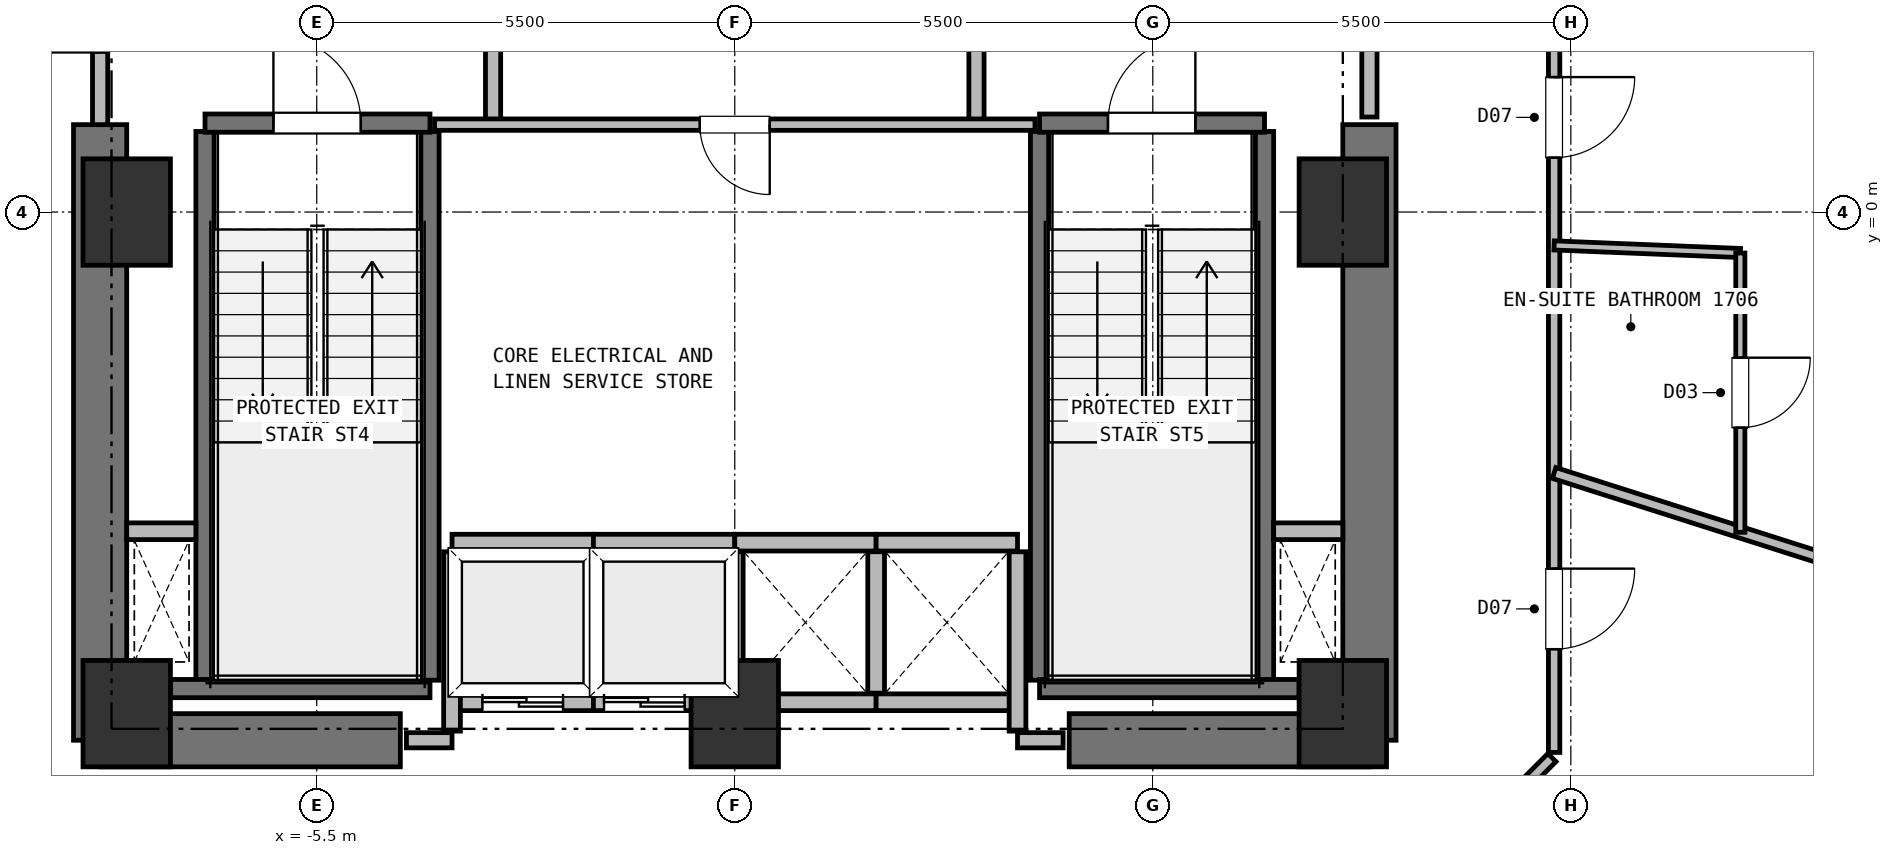
"""IFC4 building model, lengths in metres.
Left out: names, types, materials, properties, quantities, classifications, styles, units other than length and angle.
Written with IfcOpenShell. Run it as: python <this file> out.ifc"""

import sys

from ifc_helpers import new_model, si_unit, direction, frame, frame_2d, origin, origin_2d, place, context, subcontext, project, spatial, rectangle, extrude, element, fill, save


model = new_model("IFC4")
c1 = context("Model", 3, precision=1e-05, world=origin(), true_north=direction((0.0, 1.0)))
c2 = subcontext(c1, "Body", "Model", "MODEL_VIEW")
j1 = project(units=[si_unit("LENGTHUNIT", "METRE"), si_unit("PLANEANGLEUNIT", "RADIAN")], contexts=[c1])
p1 = place(None, origin())
s1 = spatial("IfcSite", under=j1, at=p1, CompositionType="ELEMENT")
p2 = place(p1, origin())
s2 = spatial("IfcBuilding", under=s1, at=p2, CompositionType="ELEMENT")
p3 = place(p2, frame((0.0, 0.0, 60.5)))
s3 = spatial("IfcBuildingStorey", under=s2, at=p3, CompositionType="ELEMENT", Elevation=60.5)
for number, where, z_axis, x_axis in (
    (1, (-8.0, -6.6, 0.0), (0.0, 0.0, 1.0), (1.0, 0.0, 0.0)),
    (2, (0.0, -6.6, 0.0), (0.0, 0.0, 1.0), (1.0, 0.0, 0.0)),
    (3, (8.0, -6.6, 0.0), (0.0, 0.0, 1.0), (1.0, 0.0, 0.0)),
    (4, (8.0, 0.0, 0.0), (0.0, 0.0, 1.0), (1.0, 0.0, 0.0)),
    (5, (-8.0, 0.0, 0.0), (0.0, 0.0, 1.0), (1.0, 0.0, 0.0)),
):
    element("IfcColumn", number, at=place(p3, frame(where, z_axis=z_axis, x_axis=x_axis)), inside=s3, PredefinedType="COLUMN", context=c2, shape_type="SweptSolid", body=[
        extrude(rectangle(XDim=1.15, YDim=1.4, at=origin_2d()), origin(), (0.0, 0.0, 1.0), 3.75),
    ])
for number, where, z_axis, x_axis in (
    (6, (-8.35, -6.95, 0.0), (0.0, 0.0, 1.0), (1.0, 0.0, 0.0)),
    (7, (4.4, -6.95, 0.0), (0.0, 0.0, 1.0), (1.0, 0.0, 0.0)),
):
    element("IfcWall", number, at=place(p3, frame(where, z_axis=z_axis, x_axis=x_axis)), inside=s3, PredefinedType="SHEAR", context=c2, shape_type="SweptSolid", body=[
        extrude(rectangle(XDim=3.95, YDim=0.7, at=frame_2d((1.975, 0.0))), origin(), (0.0, 0.0, 1.0), 3.5),
    ])
for number, where, z_axis, x_axis in (
    (8, (-8.35, -6.95, 0.0), (0.0, 0.0, 1.0), (0.0, 1.0, 0.0)),
    (9, (8.35, -6.95, 0.0), (0.0, 0.0, 1.0), (0.0, 1.0, 0.0)),
):
    element("IfcWall", number, at=place(p3, frame(where, z_axis=z_axis, x_axis=x_axis)), inside=s3, PredefinedType="SHEAR", context=c2, shape_type="SweptSolid", body=[
        extrude(rectangle(XDim=8.1, YDim=0.7, at=frame_2d((4.05, 0.0))), origin(), (0.0, 0.0, 1.0), 3.5),
    ])
p4 = place(p3, frame((-6.97, -6.16, 0.0), z_axis=(0.0, 0.0, 1.0), x_axis=(0.0, 1.0, 0.0)))
e10 = element("IfcWall", 10, at=p4, inside=s3, PredefinedType="SHEAR", context=c2, shape_type="SweptSolid", body=[
    extrude(rectangle(XDim=7.22, YDim=0.24, at=frame_2d((3.61, 0.0))), origin(), (0.0, 0.0, 1.0), 3.5),
])
p5 = place(p3, frame((-7.425, -6.27, 0.0), z_axis=(0.0, 0.0, 1.0), x_axis=(1.0, 0.0, 0.0)))
e11 = element("IfcWall", 11, at=p5, inside=s3, PredefinedType="SHEAR", context=c2, shape_type="SweptSolid", body=[
    extrude(rectangle(XDim=3.415, YDim=0.24, at=frame_2d((1.708, 0.0))), origin(), (0.0, 0.0, 1.0), 3.5),
])
p6 = place(p3, frame((-4.01, -6.16, 0.0), z_axis=(0.0, 0.0, 1.0), x_axis=(0.0, 1.0, 0.0)))
e12 = element("IfcWall", 12, at=p6, inside=s3, PredefinedType="SHEAR", context=c2, shape_type="SweptSolid", body=[
    extrude(rectangle(XDim=7.22, YDim=0.24, at=frame_2d((3.61, 0.0))), origin(), (0.0, 0.0, 1.0), 3.5),
])
p7 = place(p3, frame((-6.97, 1.17, 0.0), z_axis=(0.0, 0.0, 1.0), x_axis=(1.0, 0.0, 0.0)))
e13 = element("IfcWall", 13, at=p7, inside=s3, PredefinedType="SHEAR", context=c2, shape_type="SweptSolid", body=[
    extrude(rectangle(XDim=2.96, YDim=0.24, at=frame_2d((1.48, 0.0))), origin(), (0.0, 0.0, 1.0), 3.5),
])
p8 = place(p7, frame((0.9, 0.0, 0.0)))
e14 = element("IfcOpeningElement", 14, at=p8, cuts=e13, PredefinedType="OPENING", context=c2, shape_type="SweptSolid", body=[
    extrude(rectangle(XDim=1.15, YDim=2.15, at=frame_2d((0.575, 1.075))), frame((0.0, 0.13, 0.0), z_axis=(0.0, -1.0, 0.0), x_axis=(1.0, 0.0, 0.0)), (0.0, 0.0, 1.0), 0.26),
])
for number, where, z_axis, x_axis in (
    (15, (4.01, -6.16, 0.0), (0.0, 0.0, 1.0), (0.0, 1.0, 0.0)),
    (16, (6.97, -6.16, 0.0), (0.0, 0.0, 1.0), (0.0, 1.0, 0.0)),
):
    element("IfcWall", number, at=place(p3, frame(where, z_axis=z_axis, x_axis=x_axis)), inside=s3, PredefinedType="SHEAR", context=c2, shape_type="SweptSolid", body=[
        extrude(rectangle(XDim=7.22, YDim=0.24, at=frame_2d((3.61, 0.0))), origin(), (0.0, 0.0, 1.0), 3.5),
    ])
p9 = place(p3, frame((4.01, -6.27, 0.0), z_axis=(0.0, 0.0, 1.0), x_axis=(1.0, 0.0, 0.0)))
e17 = element("IfcWall", 17, at=p9, inside=s3, PredefinedType="SHEAR", context=c2, shape_type="SweptSolid", body=[
    extrude(rectangle(XDim=3.415, YDim=0.24, at=frame_2d((1.708, 0.0))), origin(), (0.0, 0.0, 1.0), 3.5),
])
p10 = place(p3, frame((4.01, 1.17, 0.0), z_axis=(0.0, 0.0, 1.0), x_axis=(1.0, 0.0, 0.0)))
e18 = element("IfcWall", 18, at=p10, inside=s3, PredefinedType="SHEAR", context=c2, shape_type="SweptSolid", body=[
    extrude(rectangle(XDim=2.96, YDim=0.24, at=frame_2d((1.48, 0.0))), origin(), (0.0, 0.0, 1.0), 3.5),
])
p11 = place(p10, frame((0.9, 0.0, 0.0)))
e19 = element("IfcOpeningElement", 19, at=p11, cuts=e18, PredefinedType="OPENING", context=c2, shape_type="SweptSolid", body=[
    extrude(rectangle(XDim=1.15, YDim=2.15, at=frame_2d((0.575, 1.075))), frame((0.0, 0.13, 0.0), z_axis=(0.0, -1.0, 0.0), x_axis=(1.0, 0.0, 0.0)), (0.0, 0.0, 1.0), 0.26),
])
for number, where, z_axis, x_axis in (
    (20, (-8.0, -4.2, 0.0), (0.0, 0.0, 1.0), (1.0, 0.0, 0.0)),
    (21, (7.09, -4.2, 0.0), (0.0, 0.0, 1.0), (1.0, 0.0, 0.0)),
):
    element("IfcWall", number, at=place(p3, frame(where, z_axis=z_axis, x_axis=x_axis)), inside=s3, PredefinedType="PARTITIONING", context=c2, shape_type="SweptSolid", body=[
        extrude(rectangle(XDim=0.91, YDim=0.22, at=frame_2d((0.455, 0.0))), origin(), (0.0, 0.0, 1.0), 3.5),
    ])
p12 = place(p3, frame((-3.72, -6.45, 0.0), z_axis=(0.0, 0.0, 1.0), x_axis=(1.0, 0.0, 0.0)))
e22 = element("IfcWall", 22, at=p12, inside=s3, PredefinedType="PARTITIONING", context=c2, shape_type="SweptSolid", body=[
    extrude(rectangle(XDim=1.86, YDim=0.22, at=frame_2d((0.93, 0.0))), origin(), (0.0, 0.0, 1.0), 3.08),
])
p13 = place(p12, frame((0.4, 0.0, 0.0)))
e23 = element("IfcOpeningElement", 23, at=p13, cuts=e22, PredefinedType="OPENING", context=c2, shape_type="SweptSolid", body=[
    extrude(rectangle(XDim=1.06, YDim=2.15, at=frame_2d((0.53, 1.075))), frame((0.0, 0.12, 0.0), z_axis=(0.0, -1.0, 0.0), x_axis=(1.0, 0.0, 0.0)), (0.0, 0.0, 1.0), 0.24),
])
p14 = place(p3, frame((-3.72, -4.35, 0.0), z_axis=(0.0, 0.0, 1.0), x_axis=(1.0, 0.0, 0.0)))
e24 = element("IfcWall", 24, at=p14, inside=s3, PredefinedType="PARTITIONING", context=c2, shape_type="SweptSolid", body=[
    extrude(rectangle(XDim=1.86, YDim=0.22, at=frame_2d((0.93, 0.0))), origin(), (0.0, 0.0, 1.0), 3.5),
])
p15 = place(p3, frame((-3.72, -6.83, 0.0), z_axis=(0.0, 0.0, 1.0), x_axis=(0.0, 1.0, 0.0)))
e25 = element("IfcWall", 25, at=p15, inside=s3, PredefinedType="PARTITIONING", context=c2, shape_type="SweptSolid", body=[
    extrude(rectangle(XDim=2.36, YDim=0.22, at=frame_2d((1.18, 0.0))), origin(), (0.0, 0.0, 1.0), 3.5),
])
p16 = place(p3, frame((-1.86, -6.33, 0.0), z_axis=(0.0, 0.0, 1.0), x_axis=(0.0, 1.0, 0.0)))
e26 = element("IfcWall", 26, at=p16, inside=s3, PredefinedType="PARTITIONING", context=c2, shape_type="SweptSolid", body=[
    extrude(rectangle(XDim=1.86, YDim=0.22, at=frame_2d((0.93, 0.0))), origin(), (0.0, 0.0, 1.0), 3.5),
])
p17 = place(p3, frame((-1.86, -6.45, 0.0), z_axis=(0.0, 0.0, 1.0), x_axis=(1.0, 0.0, 0.0)))
e27 = element("IfcWall", 27, at=p17, inside=s3, PredefinedType="PARTITIONING", context=c2, shape_type="SweptSolid", body=[
    extrude(rectangle(XDim=1.86, YDim=0.22, at=frame_2d((0.93, 0.0))), origin(), (0.0, 0.0, 1.0), 3.08),
])
p18 = place(p17, frame((0.14, 0.0, 0.0)))
e28 = element("IfcOpeningElement", 28, at=p18, cuts=e27, PredefinedType="OPENING", context=c2, shape_type="SweptSolid", body=[
    extrude(rectangle(XDim=1.06, YDim=2.15, at=frame_2d((0.53, 1.075))), frame((0.0, 0.12, 0.0), z_axis=(0.0, -1.0, 0.0), x_axis=(1.0, 0.0, 0.0)), (0.0, 0.0, 1.0), 0.24),
])
for number, where, z_axis, x_axis in (
    (29, (-1.86, -4.35, 0.0), (0.0, 0.0, 1.0), (1.0, 0.0, 0.0)),
    (30, (0.0, -6.33, 0.0), (0.0, 0.0, 1.0), (0.0, 1.0, 0.0)),
):
    element("IfcWall", number, at=place(p3, frame(where, z_axis=z_axis, x_axis=x_axis)), inside=s3, PredefinedType="PARTITIONING", context=c2, shape_type="SweptSolid", body=[
        extrude(rectangle(XDim=1.86, YDim=0.22, at=frame_2d((0.93, 0.0))), origin(), (0.0, 0.0, 1.0), 3.5),
    ])
p19 = place(p3, frame((0.0, -6.45, 0.0), z_axis=(0.0, 0.0, 1.0), x_axis=(1.0, 0.0, 0.0)))
e31 = element("IfcWall", 31, at=p19, inside=s3, PredefinedType="PARTITIONING", context=c2, shape_type="SweptSolid", body=[
    extrude(rectangle(XDim=1.86, YDim=0.22, at=frame_2d((0.93, 0.0))), origin(), (0.0, 0.0, 1.0), 3.08),
])
for number, where, z_axis, x_axis in (
    (32, (0.0, -4.35, 0.0), (0.0, 0.0, 1.0), (1.0, 0.0, 0.0)),
    (33, (1.86, -6.33, 0.0), (0.0, 0.0, 1.0), (0.0, 1.0, 0.0)),
):
    element("IfcWall", number, at=place(p3, frame(where, z_axis=z_axis, x_axis=x_axis)), inside=s3, PredefinedType="PARTITIONING", context=c2, shape_type="SweptSolid", body=[
        extrude(rectangle(XDim=1.86, YDim=0.22, at=frame_2d((0.93, 0.0))), origin(), (0.0, 0.0, 1.0), 3.5),
    ])
p20 = place(p3, frame((1.86, -6.45, 0.0), z_axis=(0.0, 0.0, 1.0), x_axis=(1.0, 0.0, 0.0)))
e34 = element("IfcWall", 34, at=p20, inside=s3, PredefinedType="PARTITIONING", context=c2, shape_type="SweptSolid", body=[
    extrude(rectangle(XDim=1.86, YDim=0.22, at=frame_2d((0.93, 0.0))), origin(), (0.0, 0.0, 1.0), 3.08),
])
p21 = place(p3, frame((1.86, -4.35, 0.0), z_axis=(0.0, 0.0, 1.0), x_axis=(1.0, 0.0, 0.0)))
e35 = element("IfcWall", 35, at=p21, inside=s3, PredefinedType="PARTITIONING", context=c2, shape_type="SweptSolid", body=[
    extrude(rectangle(XDim=1.86, YDim=0.22, at=frame_2d((0.93, 0.0))), origin(), (0.0, 0.0, 1.0), 3.5),
])
p22 = place(p3, frame((3.72, -6.83, 0.0), z_axis=(0.0, 0.0, 1.0), x_axis=(0.0, 1.0, 0.0)))
e36 = element("IfcWall", 36, at=p22, inside=s3, PredefinedType="PARTITIONING", context=c2, shape_type="SweptSolid", body=[
    extrude(rectangle(XDim=2.36, YDim=0.22, at=frame_2d((1.18, 0.0))), origin(), (0.0, 0.0, 1.0), 3.5),
])
p23 = place(p3, frame((-3.18, 1.15, 0.0), z_axis=(0.0, 0.0, 1.0), x_axis=(0.0, 1.0, 0.0)))
e37 = element("IfcWall", 37, at=p23, inside=s3, PredefinedType="PARTITIONING", context=c2, shape_type="SweptSolid", body=[
    extrude(rectangle(XDim=3.3, YDim=0.2, at=frame_2d((1.65, 0.0))), origin(), (0.0, 0.0, 1.0), 3.5),
])
p24 = place(p23, frame((1.08, 0.0, 0.0)))
e38 = element("IfcOpeningElement", 38, at=p24, cuts=e37, PredefinedType="OPENING", context=c2, shape_type="SweptSolid", body=[
    extrude(rectangle(XDim=1.15, YDim=2.15, at=frame_2d((0.575, 1.075))), frame((0.0, 0.11, 0.0), z_axis=(0.0, -1.0, 0.0), x_axis=(1.0, 0.0, 0.0)), (0.0, 0.0, 1.0), 0.22),
])
p25 = place(p3, frame((3.18, 1.15, 0.0), z_axis=(0.0, 0.0, 1.0), x_axis=(0.0, 1.0, 0.0)))
e39 = element("IfcWall", 39, at=p25, inside=s3, PredefinedType="PARTITIONING", context=c2, shape_type="SweptSolid", body=[
    extrude(rectangle(XDim=3.3, YDim=0.2, at=frame_2d((1.65, 0.0))), origin(), (0.0, 0.0, 1.0), 3.5),
])
p26 = place(p25, frame((1.08, 0.0, 0.0)))
e40 = element("IfcOpeningElement", 40, at=p26, cuts=e39, PredefinedType="OPENING", context=c2, shape_type="SweptSolid", body=[
    extrude(rectangle(XDim=1.15, YDim=2.15, at=frame_2d((0.575, 1.075))), frame((0.0, 0.11, 0.0), z_axis=(0.0, -1.0, 0.0), x_axis=(1.0, 0.0, 0.0)), (0.0, 0.0, 1.0), 0.22),
])
p27 = place(p3, frame((-8.35, 1.15, 0.0), z_axis=(0.0, 0.0, 1.0), x_axis=(0.0, 1.0, 0.0)))
e41 = element("IfcWall", 41, at=p27, inside=s3, PredefinedType="PARTITIONING", context=c2, shape_type="SweptSolid", body=[
    extrude(rectangle(XDim=5.4, YDim=0.2, at=frame_2d((2.7, 0.0))), origin(), (0.0, 0.0, 1.0), 3.5),
])
p28 = place(p27, frame((0.95, 0.0, 0.0)))
e42 = element("IfcOpeningElement", 42, at=p28, cuts=e41, PredefinedType="OPENING", context=c2, shape_type="SweptSolid", body=[
    extrude(rectangle(XDim=1.15, YDim=2.15, at=frame_2d((0.575, 1.075))), frame((0.0, 0.11, 0.0), z_axis=(0.0, -1.0, 0.0), x_axis=(1.0, 0.0, 0.0)), (0.0, 0.0, 1.0), 0.22),
])
p29 = place(p3, frame((8.35, 1.25, 0.0), z_axis=(0.0, 0.0, 1.0), x_axis=(0.0, 1.0, 0.0)))
e43 = element("IfcWall", 43, at=p29, inside=s3, PredefinedType="PARTITIONING", context=c2, shape_type="SweptSolid", body=[
    extrude(rectangle(XDim=5.3, YDim=0.2, at=frame_2d((2.65, 0.0))), origin(), (0.0, 0.0, 1.0), 3.5),
])
p30 = place(p29, frame((0.95, 0.0, 0.0)))
e44 = element("IfcOpeningElement", 44, at=p30, cuts=e43, PredefinedType="OPENING", context=c2, shape_type="SweptSolid", body=[
    extrude(rectangle(XDim=1.15, YDim=2.15, at=frame_2d((0.575, 1.075))), frame((0.0, 0.11, 0.0), z_axis=(0.0, -1.0, 0.0), x_axis=(1.0, 0.0, 0.0)), (0.0, 0.0, 1.0), 0.22),
])
p31 = place(p3, frame((3.95, 1.15, 0.0), z_axis=(0.0, 0.0, 1.0), x_axis=(-1.0, 0.0, 0.0)))
e45 = element("IfcWall", 45, at=p31, inside=s3, PredefinedType="PARTITIONING", context=c2, shape_type="SweptSolid", body=[
    extrude(rectangle(XDim=7.9, YDim=0.15, at=frame_2d((3.95, 0.0))), origin(), (0.0, 0.0, 1.0), 3.5),
])
p32 = place(p31, frame((3.49, 0.0, 0.0)))
e46 = element("IfcOpeningElement", 46, at=p32, cuts=e45, PredefinedType="OPENING", context=c2, shape_type="SweptSolid", body=[
    extrude(rectangle(XDim=0.92, YDim=2.05, at=frame_2d((0.46, 1.025))), frame((0.0, 0.085, 0.0), z_axis=(0.0, -1.0, 0.0), x_axis=(1.0, 0.0, 0.0)), (0.0, 0.0, 1.0), 0.17),
])
for number, where, z_axis, x_axis in (
    (47, (-4.32, -6.95, 0.0), (0.0, 0.0, 1.0), (1.0, 0.0, 0.0)),
    (48, (3.72, -6.95, 0.0), (0.0, 0.0, 1.0), (1.0, 0.0, 0.0)),
):
    element("IfcWall", number, at=place(p3, frame(where, z_axis=z_axis, x_axis=x_axis)), inside=s3, PredefinedType="PARTITIONING", context=c2, shape_type="SweptSolid", body=[
        extrude(rectangle(XDim=0.6, YDim=0.2, at=frame_2d((0.3, 0.0))), origin(), (0.0, 0.0, 1.0), 3.5),
    ])
p33 = place(p3, frame((10.752, -7.178, 0.0), z_axis=(0.0, 0.0, 1.0), x_axis=(-0.707067066127, -0.707146494016, 0.0)))
e49 = element("IfcWall", 49, at=p33, inside=s3, PredefinedType="PARTITIONING", context=c2, shape_type="SweptSolid", body=[
    extrude(rectangle(XDim=3.074, YDim=0.15, at=frame_2d((1.537, 0.0))), origin(), (0.0, 0.0, 1.0), 3.12),
])
p34 = place(p3, frame((10.78, 7.11, 0.0), z_axis=(0.0, 0.0, 1.0), x_axis=(0.0, -1.0, 0.0)))
e50 = element("IfcWall", 50, at=p34, inside=s3, PredefinedType="PARTITIONING", context=c2, shape_type="SweptSolid", body=[
    extrude(rectangle(XDim=14.22, YDim=0.15, at=frame_2d((7.11, 0.0))), origin(), (0.0, 0.0, 1.0), 3.12),
])
p35 = place(p34, frame((5.334, 0.0, 0.0)))
e51 = element("IfcOpeningElement", 51, at=p35, cuts=e50, PredefinedType="OPENING", context=c2, shape_type="SweptSolid", body=[
    extrude(rectangle(XDim=1.06, YDim=2.15, at=frame_2d((0.53, 1.075))), frame((0.0, 0.085, 0.0), z_axis=(0.0, -1.0, 0.0), x_axis=(1.0, 0.0, 0.0)), (0.0, 0.0, 1.0), 0.17),
])
p36 = place(p34, frame((11.802, 0.0, 0.0)))
e52 = element("IfcOpeningElement", 52, at=p36, cuts=e50, PredefinedType="OPENING", context=c2, shape_type="SweptSolid", body=[
    extrude(rectangle(XDim=1.06, YDim=2.15, at=frame_2d((0.53, 1.075))), frame((0.0, 0.085, 0.0), z_axis=(0.0, -1.0, 0.0), x_axis=(1.0, 0.0, 0.0)), (0.0, 0.0, 1.0), 0.17),
])
p37 = place(p3, frame((-8.578, -9.352, 0.0), z_axis=(0.0, 0.0, 1.0), x_axis=(-0.707067066127, 0.707146494016, 0.0)))
e53 = element("IfcWall", 53, at=p37, inside=s3, PredefinedType="PARTITIONING", context=c2, shape_type="SweptSolid", body=[
    extrude(rectangle(XDim=3.074, YDim=0.15, at=frame_2d((1.537, 0.0))), origin(), (0.0, 0.0, 1.0), 3.5),
])
p38 = place(p3, frame((10.78, -3.433, 0.0), z_axis=(0.0, 0.0, 1.0), x_axis=(0.952837774097, -0.303480108497, 0.0)))
e54 = element("IfcWall", 54, at=p38, inside=s3, PredefinedType="PARTITIONING", context=c2, shape_type="SweptSolid", body=[
    extrude(rectangle(XDim=14.143, YDim=0.15, at=frame_2d((7.071, 0.0))), origin(), (0.0, 0.0, 1.0), 3.5),
])
p39 = place(p3, frame((13.23, -0.539, 0.0), z_axis=(0.0, 0.0, 1.0), x_axis=(-0.999170452606, 0.040723539125, 0.0)))
e55 = element("IfcWall", 55, at=p39, inside=s3, PredefinedType="PARTITIONING", context=c2, shape_type="SweptSolid", body=[
    extrude(rectangle(XDim=2.452, YDim=0.12, at=frame_2d((1.226, 0.0))), origin(), (0.0, 0.0, 1.0), 3.5),
])
p40 = place(p3, frame((13.23, -0.539, 0.0), z_axis=(0.0, 0.0, 1.0), x_axis=(0.0, -1.0, 0.0)))
e56 = element("IfcWall", 56, at=p40, inside=s3, PredefinedType="PARTITIONING", context=c2, shape_type="SweptSolid", body=[
    extrude(rectangle(XDim=3.675, YDim=0.12, at=frame_2d((1.837, 0.0))), origin(), (0.0, 0.0, 1.0), 3.12),
])
p41 = place(p40, frame((1.377, 0.0, 0.0)))
e57 = element("IfcOpeningElement", 57, at=p41, cuts=e56, PredefinedType="OPENING", context=c2, shape_type="SweptSolid", body=[
    extrude(rectangle(XDim=0.92, YDim=2.1, at=frame_2d((0.46, 1.05))), frame((0.0, 0.07, 0.0), z_axis=(0.0, -1.0, 0.0), x_axis=(1.0, 0.0, 0.0)), (0.0, 0.0, 1.0), 0.14),
])
p42 = place(p8, origin())
e58 = element("IfcDoor", 58, at=p42, inside=s3, OperationType="SINGLE_SWING_LEFT", PredefinedType="DOOR", context=c2, shape_type="SweptSolid", body=[
    extrude(rectangle(XDim=1.15, YDim=2.15, at=frame_2d((0.575, 1.075))), frame((0.0, 0.025, 0.0), z_axis=(0.0, -1.0, 0.0), x_axis=(1.0, 0.0, 0.0)), (0.0, 0.0, 1.0), 0.05),
])
fill(e14, e58)
p43 = place(p11, origin())
e59 = element("IfcDoor", 59, at=p43, inside=s3, OperationType="SINGLE_SWING_RIGHT", PredefinedType="DOOR", context=c2, shape_type="SweptSolid", body=[
    extrude(rectangle(XDim=1.15, YDim=2.15, at=frame_2d((0.575, 1.075))), frame((0.0, 0.025, 0.0), z_axis=(0.0, -1.0, 0.0), x_axis=(1.0, 0.0, 0.0)), (0.0, 0.0, 1.0), 0.05),
])
fill(e19, e59)
p44 = place(p13, origin())
e60 = element("IfcDoor", 60, at=p44, inside=s3, OperationType="DOUBLE_DOOR_SLIDING", PredefinedType="DOOR", context=c2, shape_type="SweptSolid", body=[
    extrude(rectangle(XDim=1.06, YDim=2.15, at=frame_2d((0.53, 1.075))), frame((0.0, 0.025, 0.0), z_axis=(0.0, -1.0, 0.0), x_axis=(1.0, 0.0, 0.0)), (0.0, 0.0, 1.0), 0.05),
])
fill(e23, e60)
p45 = place(p18, origin())
e61 = element("IfcDoor", 61, at=p45, inside=s3, OperationType="DOUBLE_DOOR_SLIDING", PredefinedType="DOOR", context=c2, shape_type="SweptSolid", body=[
    extrude(rectangle(XDim=1.06, YDim=2.15, at=frame_2d((0.53, 1.075))), frame((0.0, 0.025, 0.0), z_axis=(0.0, -1.0, 0.0), x_axis=(1.0, 0.0, 0.0)), (0.0, 0.0, 1.0), 0.05),
])
fill(e28, e61)
p46 = place(p28, origin())
e62 = element("IfcDoor", 62, at=p46, inside=s3, OperationType="SINGLE_SWING_LEFT", PredefinedType="DOOR", context=c2, shape_type="SweptSolid", body=[
    extrude(rectangle(XDim=1.15, YDim=2.15, at=frame_2d((0.575, 1.075))), frame((0.0, 0.025, 0.0), z_axis=(0.0, -1.0, 0.0), x_axis=(1.0, 0.0, 0.0)), (0.0, 0.0, 1.0), 0.05),
])
fill(e42, e62)
p47 = place(p32, origin())
e63 = element("IfcDoor", 63, at=p47, inside=s3, OperationType="SINGLE_SWING_LEFT", PredefinedType="DOOR", context=c2, shape_type="SweptSolid", body=[
    extrude(rectangle(XDim=0.92, YDim=2.05, at=frame_2d((0.46, 1.025))), frame((0.0, 0.025, 0.0), z_axis=(0.0, -1.0, 0.0), x_axis=(1.0, 0.0, 0.0)), (0.0, 0.0, 1.0), 0.05),
])
fill(e46, e63)
p48 = place(p41, origin())
e64 = element("IfcDoor", 64, at=p48, inside=s3, OperationType="SINGLE_SWING_LEFT", PredefinedType="DOOR", context=c2, shape_type="SweptSolid", body=[
    extrude(rectangle(XDim=0.92, YDim=2.1, at=frame_2d((0.46, 1.05))), frame((0.0, 0.025, 0.0), z_axis=(0.0, -1.0, 0.0), x_axis=(1.0, 0.0, 0.0)), (0.0, 0.0, 1.0), 0.05),
])
fill(e57, e64)
p49 = place(p35, origin())
e65 = element("IfcDoor", 65, at=p49, inside=s3, OperationType="SINGLE_SWING_LEFT", PredefinedType="DOOR", context=c2, shape_type="SweptSolid", body=[
    extrude(rectangle(XDim=1.06, YDim=2.15, at=frame_2d((0.53, 1.075))), frame((0.0, 0.025, 0.0), z_axis=(0.0, -1.0, 0.0), x_axis=(1.0, 0.0, 0.0)), (0.0, 0.0, 1.0), 0.05),
])
fill(e51, e65)
p50 = place(p36, origin())
e66 = element("IfcDoor", 66, at=p50, inside=s3, OperationType="SINGLE_SWING_LEFT", PredefinedType="DOOR", context=c2, shape_type="SweptSolid", body=[
    extrude(rectangle(XDim=1.06, YDim=2.15, at=frame_2d((0.53, 1.075))), frame((0.0, 0.025, 0.0), z_axis=(0.0, -1.0, 0.0), x_axis=(1.0, 0.0, 0.0)), (0.0, 0.0, 1.0), 0.05),
])
fill(e52, e66)
save(model, sys.argv[1])
